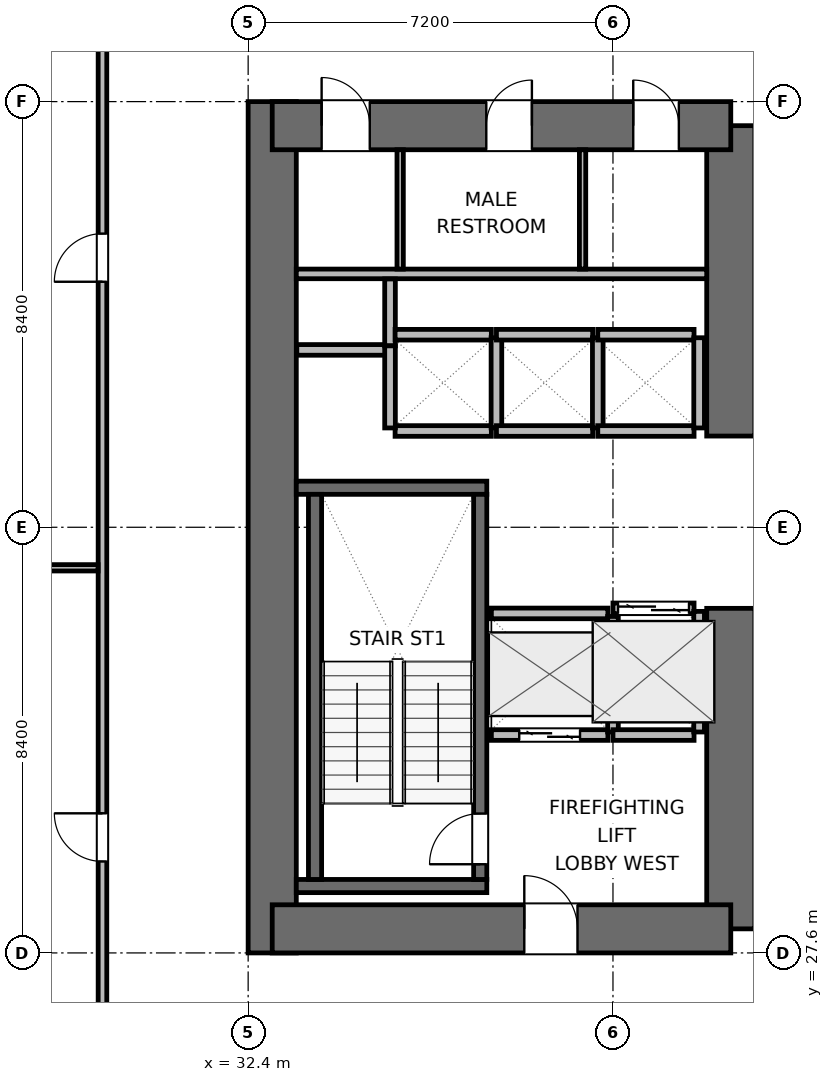
"""IFC4 building model, lengths in metres.
Left out: names, types, materials, properties, quantities, classifications, styles, units other than length and angle.
Written with IfcOpenShell. Run it as: python <this file> out.ifc"""

import sys

from ifc_helpers import new_model, si_unit, direction, frame, frame_2d, origin, place, context, subcontext, project, spatial, rectangle, extrude, element, fill, save


model = new_model("IFC4")
c1 = context("Model", 3, precision=1e-05, world=origin(), true_north=direction((0.0, 1.0)))
c2 = subcontext(c1, "Body", "Model", "MODEL_VIEW")
j1 = project(units=[si_unit("LENGTHUNIT", "METRE"), si_unit("PLANEANGLEUNIT", "RADIAN")], contexts=[c1])
p1 = place(None, origin())
s1 = spatial("IfcSite", under=j1, at=p1, CompositionType="ELEMENT")
p2 = place(p1, origin())
s2 = spatial("IfcBuilding", under=s1, at=p2, CompositionType="ELEMENT")
p3 = place(p2, frame((0.0, 0.0, 76.8)))
s3 = spatial("IfcBuildingStorey", under=s2, at=p3, CompositionType="ELEMENT", Elevation=76.8)
p4 = place(p3, frame((32.875, 27.6, 0.0), z_axis=(0.0, 0.0, 1.0), x_axis=(0.0, 1.0, 0.0)))
e1 = element("IfcWall", 1, at=p4, inside=s3, PredefinedType="SHEAR", context=c2, shape_type="SweptSolid", body=[
    extrude(rectangle(XDim=16.8, YDim=0.95, at=frame_2d((8.4, 0.0))), origin(), (0.0, 0.0, 1.0), 3.9),
])
p5 = place(p3, frame((41.925, 28.075, 0.0), z_axis=(0.0, 0.0, 1.0), x_axis=(0.0, 1.0, 0.0)))
e2 = element("IfcWall", 2, at=p5, inside=s3, PredefinedType="SHEAR", context=c2, shape_type="SweptSolid", body=[
    extrude(rectangle(XDim=6.325, YDim=0.95, at=frame_2d((3.163, 0.0))), origin(), (0.0, 0.0, 1.0), 3.9),
])
p6 = place(p3, frame((41.925, 37.8, 0.0), z_axis=(0.0, 0.0, 1.0), x_axis=(0.0, 1.0, 0.0)))
e3 = element("IfcWall", 3, at=p6, inside=s3, PredefinedType="SHEAR", context=c2, shape_type="SweptSolid", body=[
    extrude(rectangle(XDim=6.125, YDim=0.95, at=frame_2d((3.062, 0.0))), origin(), (0.0, 0.0, 1.0), 3.9),
])
p7 = place(p3, frame((32.875, 28.075, 0.0), z_axis=(0.0, 0.0, 1.0), x_axis=(1.0, 0.0, 0.0)))
e4 = element("IfcWall", 4, at=p7, inside=s3, PredefinedType="SHEAR", context=c2, shape_type="SweptSolid", body=[
    extrude(rectangle(XDim=9.05, YDim=0.95, at=frame_2d((4.525, 0.0))), origin(), (0.0, 0.0, 1.0), 3.9),
])
p8 = place(p7, frame((4.975, 0.0, 0.0)))
e5 = element("IfcOpeningElement", 5, at=p8, cuts=e4, PredefinedType="OPENING", context=c2, shape_type="SweptSolid", body=[
    extrude(rectangle(XDim=1.05, YDim=2.04, at=frame_2d((0.525, 1.02))), frame((0.0, 0.485, 0.0), z_axis=(0.0, -1.0, 0.0), x_axis=(1.0, 0.0, 0.0)), (0.0, 0.0, 1.0), 0.97),
])
p9 = place(p3, frame((32.875, 43.925, 0.0), z_axis=(0.0, 0.0, 1.0), x_axis=(1.0, 0.0, 0.0)))
e6 = element("IfcWall", 6, at=p9, inside=s3, PredefinedType="SHEAR", context=c2, shape_type="SweptSolid", body=[
    extrude(rectangle(XDim=9.05, YDim=0.95, at=frame_2d((4.525, 0.0))), origin(), (0.0, 0.0, 1.0), 3.9),
])
p10 = place(p9, frame((0.975, 0.0, 0.0)))
e7 = element("IfcOpeningElement", 7, at=p10, cuts=e6, PredefinedType="OPENING", context=c2, shape_type="SweptSolid", body=[
    extrude(rectangle(XDim=0.95, YDim=2.04, at=frame_2d((0.475, 1.02))), frame((0.0, 0.485, 0.0), z_axis=(0.0, -1.0, 0.0), x_axis=(1.0, 0.0, 0.0)), (0.0, 0.0, 1.0), 0.97),
])
p11 = place(p9, frame((4.225, 0.0, 0.0)))
e8 = element("IfcOpeningElement", 8, at=p11, cuts=e6, PredefinedType="OPENING", context=c2, shape_type="SweptSolid", body=[
    extrude(rectangle(XDim=0.9, YDim=2.02, at=frame_2d((0.45, 1.01))), frame((0.0, 0.485, 0.0), z_axis=(0.0, -1.0, 0.0), x_axis=(1.0, 0.0, 0.0)), (0.0, 0.0, 1.0), 0.97),
])
p12 = place(p9, frame((7.125, 0.0, 0.0)))
e9 = element("IfcOpeningElement", 9, at=p12, cuts=e6, PredefinedType="OPENING", context=c2, shape_type="SweptSolid", body=[
    extrude(rectangle(XDim=0.9, YDim=2.02, at=frame_2d((0.45, 1.01))), frame((0.0, 0.485, 0.0), z_axis=(0.0, -1.0, 0.0), x_axis=(1.0, 0.0, 0.0)), (0.0, 0.0, 1.0), 0.97),
])
for number, where, z_axis, x_axis in (
    (10, (33.35, 28.92, 0.0), (0.0, 0.0, 1.0), (1.0, 0.0, 0.0)),
    (11, (33.35, 36.78, 0.0), (0.0, 0.0, 1.0), (1.0, 0.0, 0.0)),
):
    element("IfcWall", number, at=place(p3, frame(where, z_axis=z_axis, x_axis=x_axis)), inside=s3, PredefinedType="SHEAR", context=c2, shape_type="SweptSolid", body=[
        extrude(rectangle(XDim=3.76, YDim=0.26, at=frame_2d((1.88, 0.0))), origin(), (0.0, 0.0, 1.0), 3.9),
    ])
p13 = place(p3, frame((33.72, 29.05, 0.0), z_axis=(0.0, 0.0, 1.0), x_axis=(0.0, 1.0, 0.0)))
e12 = element("IfcWall", 12, at=p13, inside=s3, PredefinedType="SHEAR", context=c2, shape_type="SweptSolid", body=[
    extrude(rectangle(XDim=7.6, YDim=0.26, at=frame_2d((3.8, 0.0))), origin(), (0.0, 0.0, 1.0), 3.9),
])
p14 = place(p3, frame((36.98, 29.05, 0.0), z_axis=(0.0, 0.0, 1.0), x_axis=(0.0, 1.0, 0.0)))
e13 = element("IfcWall", 13, at=p14, inside=s3, PredefinedType="SHEAR", context=c2, shape_type="SweptSolid", body=[
    extrude(rectangle(XDim=7.6, YDim=0.26, at=frame_2d((3.8, 0.0))), origin(), (0.0, 0.0, 1.0), 3.9),
])
p15 = place(p14, frame((0.3, 0.0, 0.0)))
e14 = element("IfcOpeningElement", 14, at=p15, cuts=e13, PredefinedType="OPENING", context=c2, shape_type="SweptSolid", body=[
    extrude(rectangle(XDim=1.0, YDim=2.04, at=frame_2d((0.5, 1.02))), frame((0.0, 0.14, 0.0), z_axis=(0.0, -1.0, 0.0), x_axis=(1.0, 0.0, 0.0)), (0.0, 0.0, 1.0), 0.28),
])
p16 = place(p3, frame((33.35, 41.0, 0.0), z_axis=(0.0, 0.0, 1.0), x_axis=(1.0, 0.0, 0.0)))
e15 = element("IfcWall", 15, at=p16, inside=s3, PredefinedType="PLUMBINGWALL", context=c2, shape_type="SweptSolid", body=[
    extrude(rectangle(XDim=8.1, YDim=0.19, at=frame_2d((4.05, 0.0))), origin(), (0.0, 0.0, 1.0), 3.6),
])
for number, where, z_axis, x_axis in (
    (16, (35.4, 41.095, 0.0), (0.0, 0.0, 1.0), (0.0, 1.0, 0.0)),
    (17, (39.0, 41.095, 0.0), (0.0, 0.0, 1.0), (0.0, 1.0, 0.0)),
):
    element("IfcWall", number, at=place(p3, frame(where, z_axis=z_axis, x_axis=x_axis)), inside=s3, PredefinedType="PARTITIONING", context=c2, shape_type="SweptSolid", body=[
        extrude(rectangle(XDim=2.355, YDim=0.125, at=frame_2d((1.177, 0.0))), origin(), (0.0, 0.0, 1.0), 3.6),
    ])
p17 = place(p3, frame((33.36, 39.5, 0.0), z_axis=(0.0, 0.0, 1.0), x_axis=(1.0, 0.0, 0.0)))
e18 = element("IfcWall", 18, at=p17, inside=s3, PredefinedType="PARTITIONING", context=c2, shape_type="SweptSolid", body=[
    extrude(rectangle(XDim=1.86, YDim=0.21, at=frame_2d((0.93, 0.0))), origin(), (0.0, 0.0, 1.0), 3.6),
])
p18 = place(p3, frame((35.2, 39.58, 0.0), z_axis=(0.0, 0.0, 1.0), x_axis=(0.0, 1.0, 0.0)))
e19 = element("IfcWall", 19, at=p18, inside=s3, PredefinedType="PARTITIONING", context=c2, shape_type="SweptSolid", body=[
    extrude(rectangle(XDim=1.32, YDim=0.21, at=frame_2d((0.66, 0.0))), origin(), (0.0, 0.0, 1.0), 3.6),
])
p19 = place(p3, frame((37.2, 31.9, 0.0), z_axis=(0.0, 0.0, 1.0), x_axis=(1.0, 0.0, 0.0)))
e20 = element("IfcWall", 20, at=p19, inside=s3, PredefinedType="PARTITIONING", context=c2, shape_type="SweptSolid", body=[
    extrude(rectangle(XDim=2.3, YDim=0.21, at=frame_2d((1.15, 0.0))), origin(), (0.0, 0.0, 1.0), 3.6),
])
p20 = place(p19, frame((0.55, 0.0, 0.0)))
e21 = element("IfcOpeningElement", 21, at=p20, cuts=e20, PredefinedType="OPENING", context=c2, shape_type="SweptSolid", body=[
    extrude(rectangle(XDim=1.2, YDim=2.04, at=frame_2d((0.6, 1.02))), frame((0.0, 0.115, 0.0), z_axis=(0.0, -1.0, 0.0), x_axis=(1.0, 0.0, 0.0)), (0.0, 0.0, 1.0), 0.23),
])
p21 = place(p3, frame((37.2, 34.3, 0.0), z_axis=(0.0, 0.0, 1.0), x_axis=(1.0, 0.0, 0.0)))
e22 = element("IfcWall", 22, at=p21, inside=s3, PredefinedType="PARTITIONING", context=c2, shape_type="SweptSolid", body=[
    extrude(rectangle(XDim=2.3, YDim=0.21, at=frame_2d((1.15, 0.0))), origin(), (0.0, 0.0, 1.0), 3.6),
])
p22 = place(p3, frame((39.6, 31.96, 0.0), z_axis=(0.0, 0.0, 1.0), x_axis=(0.0, 1.0, 0.0)))
e23 = element("IfcWall", 23, at=p22, inside=s3, PredefinedType="PARTITIONING", context=c2, shape_type="SweptSolid", body=[
    extrude(rectangle(XDim=2.28, YDim=0.21, at=frame_2d((1.14, 0.0))), origin(), (0.0, 0.0, 1.0), 3.6),
])
p23 = place(p3, frame((39.6, 34.4, 0.0), z_axis=(0.0, 0.0, 1.0), x_axis=(1.0, 0.0, 0.0)))
e24 = element("IfcWall", 24, at=p23, inside=s3, PredefinedType="PARTITIONING", context=c2, shape_type="SweptSolid", body=[
    extrude(rectangle(XDim=1.6, YDim=0.21, at=frame_2d((0.8, 0.0))), origin(), (0.0, 0.0, 1.0), 3.6),
])
p24 = place(p23, frame((0.1, 0.0, 0.0)))
e25 = element("IfcOpeningElement", 25, at=p24, cuts=e24, PredefinedType="OPENING", context=c2, shape_type="SweptSolid", body=[
    extrude(rectangle(XDim=1.4, YDim=2.06, at=frame_2d((0.7, 1.03))), frame((0.0, 0.115, 0.0), z_axis=(0.0, -1.0, 0.0), x_axis=(1.0, 0.0, 0.0)), (0.0, 0.0, 1.0), 0.23),
])
p25 = place(p3, frame((39.6, 31.9, 0.0), z_axis=(0.0, 0.0, 1.0), x_axis=(1.0, 0.0, 0.0)))
e26 = element("IfcWall", 26, at=p25, inside=s3, PredefinedType="PARTITIONING", context=c2, shape_type="SweptSolid", body=[
    extrude(rectangle(XDim=1.6, YDim=0.21, at=frame_2d((0.8, 0.0))), origin(), (0.0, 0.0, 1.0), 3.6),
])
p26 = place(p3, frame((41.3, 31.96, 0.0), z_axis=(0.0, 0.0, 1.0), x_axis=(0.0, 1.0, 0.0)))
e27 = element("IfcWall", 27, at=p26, inside=s3, PredefinedType="PARTITIONING", context=c2, shape_type="SweptSolid", body=[
    extrude(rectangle(XDim=2.38, YDim=0.21, at=frame_2d((1.19, 0.0))), origin(), (0.0, 0.0, 1.0), 3.6),
])
for number, where, z_axis, x_axis in (
    (28, (35.3, 37.9, 0.0), (0.0, 0.0, 1.0), (1.0, 0.0, 0.0)),
    (29, (35.3, 39.8, 0.0), (0.0, 0.0, 1.0), (1.0, 0.0, 0.0)),
):
    element("IfcWall", number, at=place(p3, frame(where, z_axis=z_axis, x_axis=x_axis)), inside=s3, PredefinedType="PARTITIONING", context=c2, shape_type="SweptSolid", body=[
        extrude(rectangle(XDim=1.9, YDim=0.21, at=frame_2d((0.95, 0.0))), origin(), (0.0, 0.0, 1.0), 3.6),
    ])
p27 = place(p3, frame((35.2, 37.96, 0.0), z_axis=(0.0, 0.0, 1.0), x_axis=(0.0, 1.0, 0.0)))
e30 = element("IfcWall", 30, at=p27, inside=s3, PredefinedType="PARTITIONING", context=c2, shape_type="SweptSolid", body=[
    extrude(rectangle(XDim=1.62, YDim=0.21, at=frame_2d((0.81, 0.0))), origin(), (0.0, 0.0, 1.0), 3.6),
])
p28 = place(p3, frame((37.3, 37.96, 0.0), z_axis=(0.0, 0.0, 1.0), x_axis=(0.0, 1.0, 0.0)))
e31 = element("IfcWall", 31, at=p28, inside=s3, PredefinedType="PARTITIONING", context=c2, shape_type="SweptSolid", body=[
    extrude(rectangle(XDim=1.78, YDim=0.21, at=frame_2d((0.89, 0.0))), origin(), (0.0, 0.0, 1.0), 3.6),
])
for number, where, z_axis, x_axis in (
    (32, (37.3, 37.9, 0.0), (0.0, 0.0, 1.0), (1.0, 0.0, 0.0)),
    (33, (37.3, 39.8, 0.0), (0.0, 0.0, 1.0), (1.0, 0.0, 0.0)),
):
    element("IfcWall", number, at=place(p3, frame(where, z_axis=z_axis, x_axis=x_axis)), inside=s3, PredefinedType="PARTITIONING", context=c2, shape_type="SweptSolid", body=[
        extrude(rectangle(XDim=1.9, YDim=0.21, at=frame_2d((0.95, 0.0))), origin(), (0.0, 0.0, 1.0), 3.6),
    ])
p29 = place(p3, frame((39.3, 37.96, 0.0), z_axis=(0.0, 0.0, 1.0), x_axis=(0.0, 1.0, 0.0)))
e34 = element("IfcWall", 34, at=p29, inside=s3, PredefinedType="PARTITIONING", context=c2, shape_type="SweptSolid", body=[
    extrude(rectangle(XDim=1.78, YDim=0.21, at=frame_2d((0.89, 0.0))), origin(), (0.0, 0.0, 1.0), 3.6),
])
for number, where, z_axis, x_axis in (
    (35, (39.3, 37.9, 0.0), (0.0, 0.0, 1.0), (1.0, 0.0, 0.0)),
    (36, (39.3, 39.8, 0.0), (0.0, 0.0, 1.0), (1.0, 0.0, 0.0)),
):
    element("IfcWall", number, at=place(p3, frame(where, z_axis=z_axis, x_axis=x_axis)), inside=s3, PredefinedType="PARTITIONING", context=c2, shape_type="SweptSolid", body=[
        extrude(rectangle(XDim=1.9, YDim=0.21, at=frame_2d((0.95, 0.0))), origin(), (0.0, 0.0, 1.0), 3.6),
    ])
p30 = place(p3, frame((41.3, 37.96, 0.0), z_axis=(0.0, 0.0, 1.0), x_axis=(0.0, 1.0, 0.0)))
e37 = element("IfcWall", 37, at=p30, inside=s3, PredefinedType="PARTITIONING", context=c2, shape_type="SweptSolid", body=[
    extrude(rectangle(XDim=1.78, YDim=0.21, at=frame_2d((0.89, 0.0))), origin(), (0.0, 0.0, 1.0), 3.6),
])
p31 = place(p3, frame((29.525, 24.647, 0.0), z_axis=(0.0, 0.0, 1.0), x_axis=(0.0, 1.0, 0.0)))
e38 = element("IfcWall", 38, at=p31, inside=s3, PredefinedType="PARTITIONING", context=c2, shape_type="SweptSolid", body=[
    extrude(rectangle(XDim=22.706, YDim=0.17, at=frame_2d((11.353, 0.0))), origin(), (0.0, 0.0, 1.0), 3.6),
])
p32 = place(p31, frame((4.758, 0.0, 0.0)))
e39 = element("IfcOpeningElement", 39, at=p32, cuts=e38, PredefinedType="OPENING", context=c2, shape_type="SweptSolid", body=[
    extrude(rectangle(XDim=0.95, YDim=2.04, at=frame_2d((0.475, 1.02))), frame((0.0, 0.095, 0.0), z_axis=(0.0, -1.0, 0.0), x_axis=(1.0, 0.0, 0.0)), (0.0, 0.0, 1.0), 0.19),
])
p33 = place(p31, frame((16.198, 0.0, 0.0)))
e40 = element("IfcOpeningElement", 40, at=p33, cuts=e38, PredefinedType="OPENING", context=c2, shape_type="SweptSolid", body=[
    extrude(rectangle(XDim=0.95, YDim=2.04, at=frame_2d((0.475, 1.02))), frame((0.0, 0.095, 0.0), z_axis=(0.0, -1.0, 0.0), x_axis=(1.0, 0.0, 0.0)), (0.0, 0.0, 1.0), 0.19),
])
p34 = place(p3, frame((18.245, 35.2, 0.0), z_axis=(0.0, 0.0, 1.0), x_axis=(1.0, 0.0, 0.0)))
e41 = element("IfcWall", 41, at=p34, inside=s3, PredefinedType="PARTITIONING", context=c2, shape_type="SweptSolid", body=[
    extrude(rectangle(XDim=11.193, YDim=0.125, at=frame_2d((5.596, 0.0))), origin(), (0.0, 0.0, 1.0), 3.6),
])
p35 = place(p15, origin())
e42 = element("IfcDoor", 42, at=p35, inside=s3, OperationType="SINGLE_SWING_LEFT", PredefinedType="DOOR", context=c2, shape_type="SweptSolid", body=[
    extrude(rectangle(XDim=1.0, YDim=2.04, at=frame_2d((0.5, 1.02))), frame((0.0, 0.025, 0.0), z_axis=(0.0, -1.0, 0.0), x_axis=(1.0, 0.0, 0.0)), (0.0, 0.0, 1.0), 0.05),
])
fill(e14, e42)
p36 = place(p20, origin())
e43 = element("IfcDoor", 43, at=p36, inside=s3, OperationType="DOUBLE_DOOR_SLIDING", PredefinedType="DOOR", context=c2, shape_type="SweptSolid", body=[
    extrude(rectangle(XDim=1.2, YDim=2.04, at=frame_2d((0.6, 1.02))), frame((0.0, 0.025, 0.0), z_axis=(0.0, -1.0, 0.0), x_axis=(1.0, 0.0, 0.0)), (0.0, 0.0, 1.0), 0.05),
])
fill(e21, e43)
p37 = place(p24, origin())
e44 = element("IfcDoor", 44, at=p37, inside=s3, OperationType="DOUBLE_DOOR_SLIDING", PredefinedType="DOOR", context=c2, shape_type="SweptSolid", body=[
    extrude(rectangle(XDim=1.4, YDim=2.06, at=frame_2d((0.7, 1.03))), frame((0.0, 0.025, 0.0), z_axis=(0.0, -1.0, 0.0), x_axis=(1.0, 0.0, 0.0)), (0.0, 0.0, 1.0), 0.05),
])
fill(e25, e44)
p38 = place(p8, origin())
e45 = element("IfcDoor", 45, at=p38, inside=s3, OperationType="SINGLE_SWING_LEFT", PredefinedType="DOOR", context=c2, shape_type="SweptSolid", body=[
    extrude(rectangle(XDim=1.05, YDim=2.04, at=frame_2d((0.525, 1.02))), frame((0.0, 0.025, 0.0), z_axis=(0.0, -1.0, 0.0), x_axis=(1.0, 0.0, 0.0)), (0.0, 0.0, 1.0), 0.05),
])
fill(e5, e45)
p39 = place(p10, origin())
e46 = element("IfcDoor", 46, at=p39, inside=s3, OperationType="SINGLE_SWING_LEFT", PredefinedType="DOOR", context=c2, shape_type="SweptSolid", body=[
    extrude(rectangle(XDim=0.95, YDim=2.04, at=frame_2d((0.475, 1.02))), frame((0.0, 0.025, 0.0), z_axis=(0.0, -1.0, 0.0), x_axis=(1.0, 0.0, 0.0)), (0.0, 0.0, 1.0), 0.05),
])
fill(e7, e46)
p40 = place(p11, origin())
e47 = element("IfcDoor", 47, at=p40, inside=s3, OperationType="SINGLE_SWING_RIGHT", PredefinedType="DOOR", context=c2, shape_type="SweptSolid", body=[
    extrude(rectangle(XDim=0.9, YDim=2.02, at=frame_2d((0.45, 1.01))), frame((0.0, 0.025, 0.0), z_axis=(0.0, -1.0, 0.0), x_axis=(1.0, 0.0, 0.0)), (0.0, 0.0, 1.0), 0.05),
])
fill(e8, e47)
p41 = place(p12, origin())
e48 = element("IfcDoor", 48, at=p41, inside=s3, OperationType="SINGLE_SWING_LEFT", PredefinedType="DOOR", context=c2, shape_type="SweptSolid", body=[
    extrude(rectangle(XDim=0.9, YDim=2.02, at=frame_2d((0.45, 1.01))), frame((0.0, 0.025, 0.0), z_axis=(0.0, -1.0, 0.0), x_axis=(1.0, 0.0, 0.0)), (0.0, 0.0, 1.0), 0.05),
])
fill(e9, e48)
p42 = place(p32, origin())
e49 = element("IfcDoor", 49, at=p42, inside=s3, OperationType="SINGLE_SWING_RIGHT", PredefinedType="DOOR", context=c2, shape_type="SweptSolid", body=[
    extrude(rectangle(XDim=0.95, YDim=2.04, at=frame_2d((0.475, 1.02))), frame((0.0, 0.025, 0.0), z_axis=(0.0, -1.0, 0.0), x_axis=(1.0, 0.0, 0.0)), (0.0, 0.0, 1.0), 0.05),
])
fill(e39, e49)
p43 = place(p33, origin())
e50 = element("IfcDoor", 50, at=p43, inside=s3, OperationType="SINGLE_SWING_LEFT", PredefinedType="DOOR", context=c2, shape_type="SweptSolid", body=[
    extrude(rectangle(XDim=0.95, YDim=2.04, at=frame_2d((0.475, 1.02))), frame((0.0, 0.025, 0.0), z_axis=(0.0, -1.0, 0.0), x_axis=(1.0, 0.0, 0.0)), (0.0, 0.0, 1.0), 0.05),
])
fill(e40, e50)
save(model, sys.argv[1])
